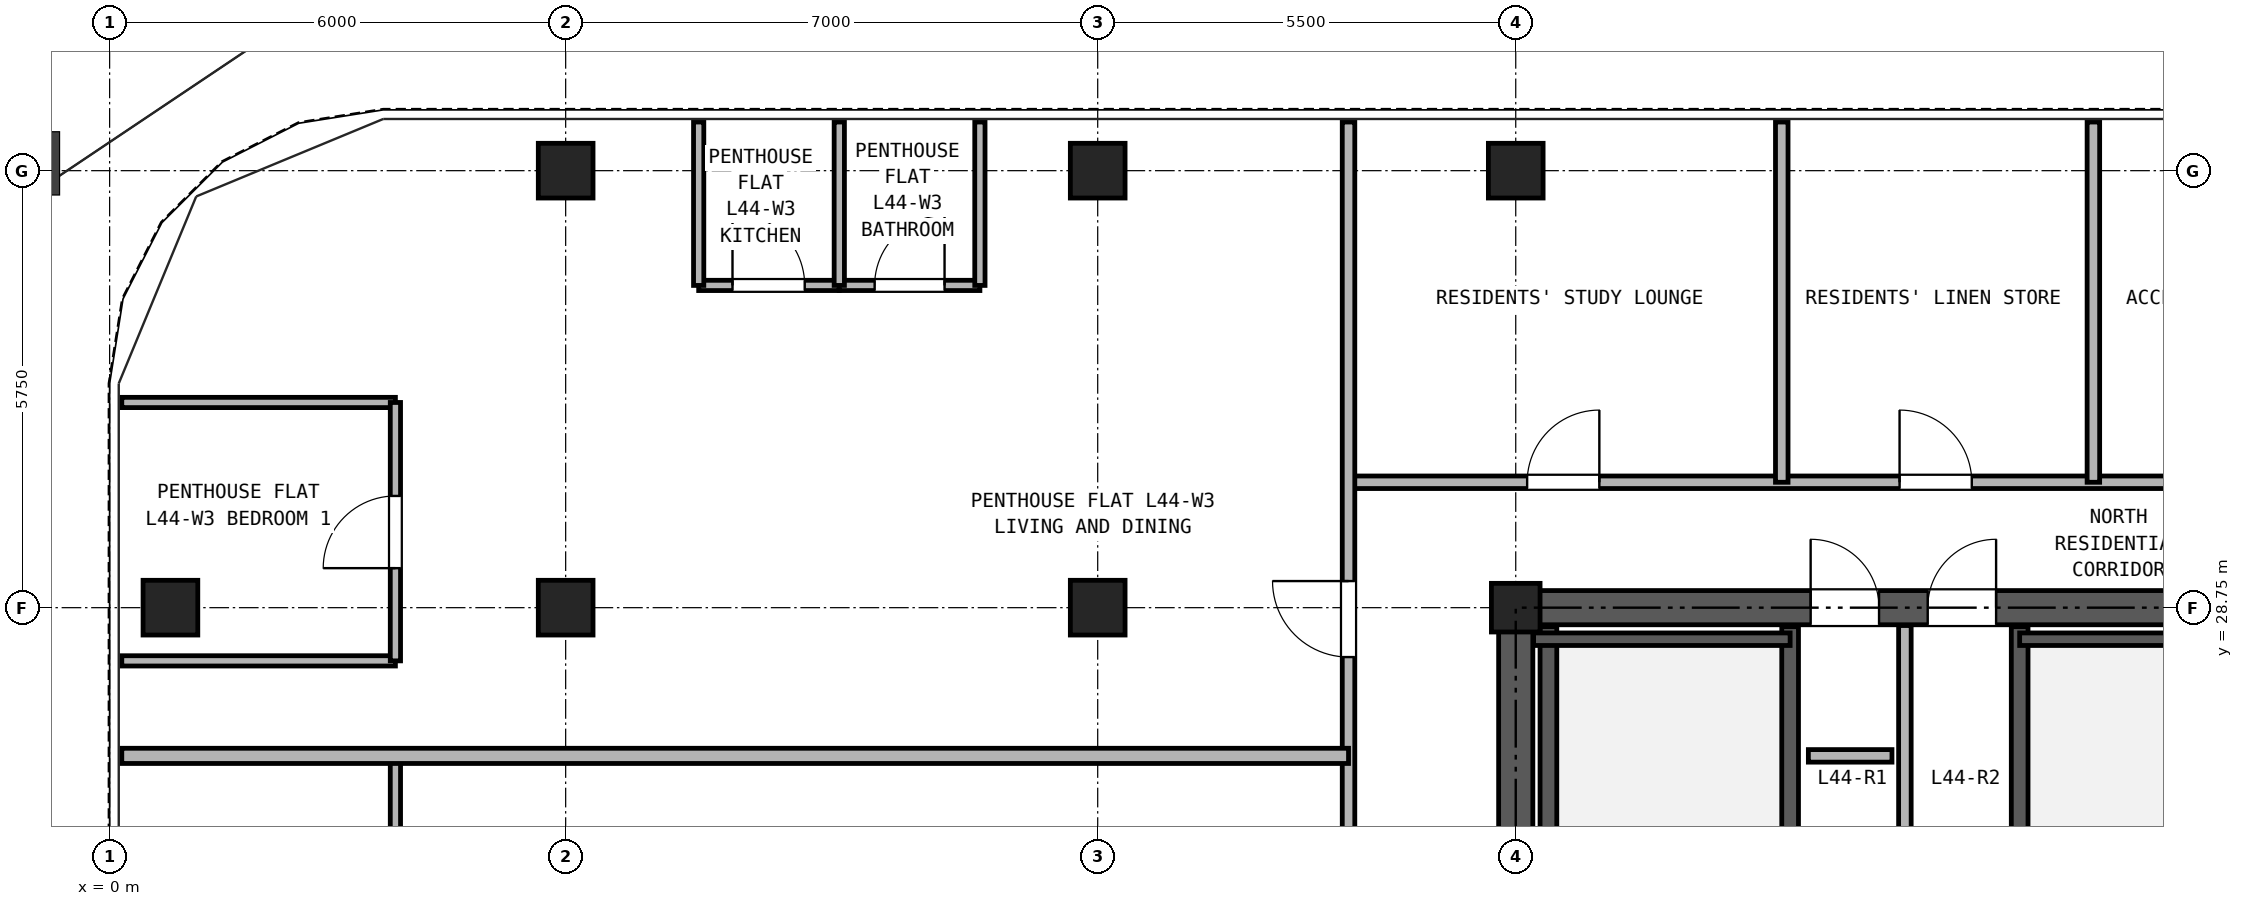
"""IFC4 building model, lengths in metres.
Left out: names, types, materials, properties, quantities, classifications, styles, units other than length and angle.
Written with IfcOpenShell. Run it as: python <this file> out.ifc"""

import sys

from ifc_helpers import new_model, si_unit, direction, frame, frame_2d, origin, origin_2d, place, context, subcontext, project, spatial, rectangle, hollow_rectangle, extrude, source, transform, mapped, element, fill, save


model = new_model("IFC4")
c1 = context("Model", 3, precision=1e-05, world=origin(), true_north=direction((0.0, 1.0)))
c2 = subcontext(c1, "Body", "Model", "MODEL_VIEW")
j1 = project(units=[si_unit("LENGTHUNIT", "METRE"), si_unit("PLANEANGLEUNIT", "RADIAN")], contexts=[c1])
p1 = place(None, origin())
s1 = spatial("IfcSite", under=j1, at=p1, CompositionType="ELEMENT")
p2 = place(p1, origin())
s2 = spatial("IfcBuilding", under=s1, at=p2, CompositionType="ELEMENT")
p3 = place(p2, frame((0.0, 0.0, 159.3)))
s3 = spatial("IfcBuildingStorey", under=s2, at=p3, CompositionType="ELEMENT", Elevation=159.3)
m1 = source(origin(), c2, "Body", "SweptSolid", [
    extrude(hollow_rectangle(XDim=0.72, YDim=0.72, WallThickness=0.04, at=origin_2d()), origin(), (0.0, 0.0, 1.0), 2.95),
])
for number, where, z_axis, x_axis in (
    (1, (6.0, 34.5, 0.0), (0.0, 0.0, 1.0), (1.0, 0.0, 0.0)),
    (2, (13.0, 34.5, 0.0), (0.0, 0.0, 1.0), (1.0, 0.0, 0.0)),
    (3, (18.5, 34.5, 0.0), (0.0, 0.0, 1.0), (1.0, 0.0, 0.0)),
    (4, (0.8, 28.75, 0.0), (0.0, 0.0, 1.0), (1.0, 0.0, 0.0)),
    (5, (6.0, 28.75, 0.0), (0.0, 0.0, 1.0), (1.0, 0.0, 0.0)),
    (6, (13.0, 28.75, 0.0), (0.0, 0.0, 1.0), (1.0, 0.0, 0.0)),
):
    element("IfcColumn", number, at=place(p3, frame(where, z_axis=z_axis, x_axis=x_axis)), inside=s3, PredefinedType="COLUMN", context=c2, shape_type="MappedRepresentation", body=[
        mapped(m1, transform((0.0, 0.0, 0.0), x_axis=(1.0, 0.0, 0.0), y_axis=(0.0, 1.0, 0.0), z_axis=(0.0, 0.0, 1.0), scale=1.0)),
    ])
m2 = source(origin(), c2, "Body", "SweptSolid", [
    extrude(hollow_rectangle(XDim=0.64, YDim=0.64, WallThickness=0.035, at=origin_2d()), origin(), (0.0, 0.0, 1.0), 2.95),
])
p4 = place(p3, frame((18.5, 28.75, 0.0), z_axis=(0.0, 0.0, 1.0), x_axis=(1.0, 0.0, 0.0)))
e7 = element("IfcColumn", 7, at=p4, inside=s3, PredefinedType="COLUMN", context=c2, shape_type="MappedRepresentation", body=[
    mapped(m2, transform((0.0, 0.0, 0.0), x_axis=(1.0, 0.0, 0.0), y_axis=(0.0, 1.0, 0.0), z_axis=(0.0, 0.0, 1.0), scale=1.0)),
])
p5 = place(p3, frame((18.275, 28.75, 0.0), z_axis=(0.0, 0.0, 1.0), x_axis=(1.0, 0.0, 0.0)))
e8 = element("IfcWall", 8, at=p5, inside=s3, PredefinedType="SHEAR", context=c2, shape_type="SweptSolid", body=[
    extrude(rectangle(XDim=10.45, YDim=0.45, at=frame_2d((5.225, 0.0))), origin(), (0.0, 0.0, 1.0), 2.95),
])
p6 = place(p5, frame((4.105, 0.0, 0.0)))
e9 = element("IfcOpeningElement", 9, at=p6, cuts=e8, PredefinedType="OPENING", context=c2, shape_type="SweptSolid", body=[
    extrude(rectangle(XDim=0.9, YDim=2.05, at=frame_2d((0.45, 1.025))), frame((0.0, 0.235, 0.0), z_axis=(0.0, -1.0, 0.0), x_axis=(1.0, 0.0, 0.0)), (0.0, 0.0, 1.0), 0.47),
])
p7 = place(p5, frame((5.645, 0.0, 0.0)))
e10 = element("IfcOpeningElement", 10, at=p7, cuts=e8, PredefinedType="OPENING", context=c2, shape_type="SweptSolid", body=[
    extrude(rectangle(XDim=0.9, YDim=2.05, at=frame_2d((0.45, 1.025))), frame((0.0, 0.235, 0.0), z_axis=(0.0, -1.0, 0.0), x_axis=(1.0, 0.0, 0.0)), (0.0, 0.0, 1.0), 0.47),
])
p8 = place(p3, frame((18.5, 11.725, 0.0), z_axis=(0.0, 0.0, 1.0), x_axis=(0.0, 1.0, 0.0)))
e11 = element("IfcWall", 11, at=p8, inside=s3, PredefinedType="SHEAR", context=c2, shape_type="SweptSolid", body=[
    extrude(rectangle(XDim=16.8, YDim=0.45, at=frame_2d((8.4, 0.0))), origin(), (0.0, 0.0, 1.0), 2.95),
])
p9 = place(p8, frame((7.425, 0.0, 0.0)))
e12 = element("IfcOpeningElement", 12, at=p9, cuts=e11, PredefinedType="OPENING", context=c2, shape_type="SweptSolid", body=[
    extrude(rectangle(XDim=1.15, YDim=2.2, at=frame_2d((0.575, 1.1))), frame((0.0, 0.235, 0.0), z_axis=(0.0, -1.0, 0.0), x_axis=(1.0, 0.0, 0.0)), (0.0, 0.0, 1.0), 0.47),
])
for number, where, z_axis, x_axis in (
    (13, (18.93, 21.39, 0.0), (0.0, 0.0, 1.0), (0.0, 1.0, 0.0)),
    (14, (22.11, 21.39, 0.0), (0.0, 0.0, 1.0), (0.0, 1.0, 0.0)),
    (15, (25.13, 21.39, 0.0), (0.0, 0.0, 1.0), (0.0, 1.0, 0.0)),
):
    element("IfcWall", number, at=place(p3, frame(where, z_axis=z_axis, x_axis=x_axis)), inside=s3, PredefinedType="SOLIDWALL", context=c2, shape_type="SweptSolid", body=[
        extrude(rectangle(XDim=7.11, YDim=0.22, at=frame_2d((3.555, 0.0))), origin(), (0.0, 0.0, 1.0), 2.95),
    ])
p10 = place(p3, frame((18.735, 28.335, 0.0), z_axis=(0.0, 0.0, 1.0), x_axis=(1.0, 0.0, 0.0)))
e16 = element("IfcWall", 16, at=p10, inside=s3, PredefinedType="PARTITIONING", context=c2, shape_type="SweptSolid", body=[
    extrude(rectangle(XDim=3.375, YDim=0.165, at=frame_2d((1.688, 0.0))), origin(), (0.0, 0.0, 1.0), 2.95),
])
p11 = place(p3, frame((25.13, 28.335, 0.0), z_axis=(0.0, 0.0, 1.0), x_axis=(1.0, 0.0, 0.0)))
e17 = element("IfcWall", 17, at=p11, inside=s3, PredefinedType="PARTITIONING", context=c2, shape_type="SweptSolid", body=[
    extrude(rectangle(XDim=3.135, YDim=0.165, at=frame_2d((1.567, 0.0))), origin(), (0.0, 0.0, 1.0), 2.95),
])
p12 = place(p3, frame((23.62, 24.4, 0.0), z_axis=(0.0, 0.0, 1.0), x_axis=(0.0, 1.0, 0.0)))
e18 = element("IfcWall", 18, at=p12, inside=s3, PredefinedType="PARTITIONING", context=c2, shape_type="SweptSolid", body=[
    extrude(rectangle(XDim=4.115, YDim=0.165, at=frame_2d((2.058, 0.0))), origin(), (0.0, 0.0, 1.0), 2.95),
])
p13 = place(p3, frame((16.3, 30.4, 0.0), z_axis=(0.0, 0.0, 1.0), x_axis=(1.0, 0.0, 0.0)))
e19 = element("IfcWall", 19, at=p13, inside=s3, PredefinedType="PARTITIONING", context=c2, shape_type="SweptSolid", body=[
    extrude(rectangle(XDim=14.4, YDim=0.165, at=frame_2d((7.2, 0.0))), origin(), (0.0, 0.0, 1.0), 2.95),
])
p14 = place(p13, frame((2.35, 0.0, 0.0)))
e20 = element("IfcOpeningElement", 20, at=p14, cuts=e19, PredefinedType="OPENING", context=c2, shape_type="SweptSolid", body=[
    extrude(rectangle(XDim=0.95, YDim=2.15, at=frame_2d((0.475, 1.075))), frame((0.0, 0.093, 0.0), z_axis=(0.0, -1.0, 0.0), x_axis=(1.0, 0.0, 0.0)), (0.0, 0.0, 1.0), 0.185),
])
p15 = place(p13, frame((7.25, 0.0, 0.0)))
e21 = element("IfcOpeningElement", 21, at=p15, cuts=e19, PredefinedType="OPENING", context=c2, shape_type="SweptSolid", body=[
    extrude(rectangle(XDim=0.95, YDim=2.15, at=frame_2d((0.475, 1.075))), frame((0.0, 0.093, 0.0), z_axis=(0.0, -1.0, 0.0), x_axis=(1.0, 0.0, 0.0)), (0.0, 0.0, 1.0), 0.185),
])
p16 = place(p13, frame((11.6, 0.0, 0.0)))
e22 = element("IfcOpeningElement", 22, at=p16, cuts=e19, PredefinedType="OPENING", context=c2, shape_type="SweptSolid", body=[
    extrude(rectangle(XDim=0.92, YDim=2.1, at=frame_2d((0.46, 1.05))), frame((0.0, 0.093, 0.0), z_axis=(0.0, -1.0, 0.0), x_axis=(1.0, 0.0, 0.0)), (0.0, 0.0, 1.0), 0.185),
])
p17 = place(p3, frame((16.3, 10.9, 0.0), z_axis=(0.0, 0.0, 1.0), x_axis=(0.0, 1.0, 0.0)))
e23 = element("IfcWall", 23, at=p17, inside=s3, PredefinedType="PARTITIONING", context=c2, shape_type="SweptSolid", body=[
    extrude(rectangle(XDim=24.24, YDim=0.165, at=frame_2d((12.12, 0.0))), origin(), (0.0, 0.0, 1.0), 2.95),
])
p18 = place(p17, frame((3.3, 0.0, 0.0)))
e24 = element("IfcOpeningElement", 24, at=p18, cuts=e23, PredefinedType="OPENING", context=c2, shape_type="SweptSolid", body=[
    extrude(rectangle(XDim=1.0, YDim=2.15, at=frame_2d((0.5, 1.075))), frame((0.0, 0.093, 0.0), z_axis=(0.0, -1.0, 0.0), x_axis=(1.0, 0.0, 0.0)), (0.0, 0.0, 1.0), 0.185),
])
p19 = place(p17, frame((11.25, 0.0, 0.0)))
e25 = element("IfcOpeningElement", 25, at=p19, cuts=e23, PredefinedType="OPENING", context=c2, shape_type="SweptSolid", body=[
    extrude(rectangle(XDim=1.0, YDim=2.15, at=frame_2d((0.5, 1.075))), frame((0.0, 0.093, 0.0), z_axis=(0.0, -1.0, 0.0), x_axis=(1.0, 0.0, 0.0)), (0.0, 0.0, 1.0), 0.185),
])
p20 = place(p17, frame((17.2, 0.0, 0.0)))
e26 = element("IfcOpeningElement", 26, at=p20, cuts=e23, PredefinedType="OPENING", context=c2, shape_type="SweptSolid", body=[
    extrude(rectangle(XDim=1.0, YDim=2.15, at=frame_2d((0.5, 1.075))), frame((0.0, 0.093, 0.0), z_axis=(0.0, -1.0, 0.0), x_axis=(1.0, 0.0, 0.0)), (0.0, 0.0, 1.0), 0.185),
])
p21 = place(p3, frame((3.76, 22.444, 0.0), z_axis=(0.0, 0.0, 1.0), x_axis=(0.0, 1.0, 0.0)))
e27 = element("IfcWall", 27, at=p21, inside=s3, PredefinedType="PARTITIONING", context=c2, shape_type="SweptSolid", body=[
    extrude(rectangle(XDim=4.356, YDim=0.135, at=frame_2d((2.178, 0.0))), origin(), (0.0, 0.0, 1.0), 2.95),
])
p22 = place(p21, frame((1.698, 0.0, 0.0)))
e28 = element("IfcOpeningElement", 28, at=p22, cuts=e27, PredefinedType="OPENING", context=c2, shape_type="SweptSolid", body=[
    extrude(rectangle(XDim=0.95, YDim=2.15, at=frame_2d((0.475, 1.075))), frame((0.0, 0.077, 0.0), z_axis=(0.0, -1.0, 0.0), x_axis=(1.0, 0.0, 0.0)), (0.0, 0.0, 1.0), 0.155),
])
p23 = place(p3, frame((0.16, 26.8, 0.0), z_axis=(0.0, 0.0, 1.0), x_axis=(1.0, 0.0, 0.0)))
e29 = element("IfcWall", 29, at=p23, inside=s3, PredefinedType="PARTITIONING", context=c2, shape_type="SweptSolid", body=[
    extrude(rectangle(XDim=16.14, YDim=0.2, at=frame_2d((8.07, 0.0))), origin(), (0.0, 0.0, 1.0), 2.95),
])
p24 = place(p3, frame((7.75, 32.99, 0.0), z_axis=(0.0, 0.0, 1.0), x_axis=(1.0, 0.0, 0.0)))
e30 = element("IfcWall", 30, at=p24, inside=s3, PredefinedType="PARTITIONING", context=c2, shape_type="SweptSolid", body=[
    extrude(rectangle(XDim=1.85, YDim=0.135, at=frame_2d((0.925, 0.0))), origin(), (0.0, 0.0, 1.0), 2.95),
])
p25 = place(p24, frame((0.445, 0.0, 0.0)))
e31 = element("IfcOpeningElement", 31, at=p25, cuts=e30, PredefinedType="OPENING", context=c2, shape_type="SweptSolid", body=[
    extrude(rectangle(XDim=0.95, YDim=2.15, at=frame_2d((0.475, 1.075))), frame((0.0, 0.077, 0.0), z_axis=(0.0, -1.0, 0.0), x_axis=(1.0, 0.0, 0.0)), (0.0, 0.0, 1.0), 0.155),
])
p26 = place(p3, frame((9.6, 32.99, 0.0), z_axis=(0.0, 0.0, 1.0), x_axis=(1.0, 0.0, 0.0)))
e32 = element("IfcWall", 32, at=p26, inside=s3, PredefinedType="PARTITIONING", context=c2, shape_type="SweptSolid", body=[
    extrude(rectangle(XDim=1.85, YDim=0.135, at=frame_2d((0.925, 0.0))), origin(), (0.0, 0.0, 1.0), 2.95),
])
p27 = place(p26, frame((0.465, 0.0, 0.0)))
e33 = element("IfcOpeningElement", 33, at=p27, cuts=e32, PredefinedType="OPENING", context=c2, shape_type="SweptSolid", body=[
    extrude(rectangle(XDim=0.92, YDim=2.1, at=frame_2d((0.46, 1.05))), frame((0.0, 0.077, 0.0), z_axis=(0.0, -1.0, 0.0), x_axis=(1.0, 0.0, 0.0)), (0.0, 0.0, 1.0), 0.155),
])
for number, where, z_axis, x_axis in (
    (34, (7.75, 32.99, 0.0), (0.0, 0.0, 1.0), (0.0, 1.0, 0.0)),
    (35, (9.6, 32.99, 0.0), (0.0, 0.0, 1.0), (0.0, 1.0, 0.0)),
    (36, (11.45, 32.99, 0.0), (0.0, 0.0, 1.0), (0.0, 1.0, 0.0)),
):
    element("IfcWall", number, at=place(p3, frame(where, z_axis=z_axis, x_axis=x_axis)), inside=s3, PredefinedType="PARTITIONING", context=c2, shape_type="SweptSolid", body=[
        extrude(rectangle(XDim=2.15, YDim=0.135, at=frame_2d((1.075, 0.0))), origin(), (0.0, 0.0, 1.0), 2.95),
    ])
for number, where, z_axis, x_axis in (
    (37, (0.16, 28.05, 0.0), (0.0, 0.0, 1.0), (1.0, 0.0, 0.0)),
    (38, (0.16, 31.45, 0.0), (0.0, 0.0, 1.0), (1.0, 0.0, 0.0)),
):
    element("IfcWall", number, at=place(p3, frame(where, z_axis=z_axis, x_axis=x_axis)), inside=s3, PredefinedType="PARTITIONING", context=c2, shape_type="SweptSolid", body=[
        extrude(rectangle(XDim=3.6, YDim=0.135, at=frame_2d((1.8, 0.0))), origin(), (0.0, 0.0, 1.0), 2.95),
    ])
p28 = place(p3, frame((3.76, 28.05, 0.0), z_axis=(0.0, 0.0, 1.0), x_axis=(0.0, 1.0, 0.0)))
e39 = element("IfcWall", 39, at=p28, inside=s3, PredefinedType="PARTITIONING", context=c2, shape_type="SweptSolid", body=[
    extrude(rectangle(XDim=3.4, YDim=0.135, at=frame_2d((1.7, 0.0))), origin(), (0.0, 0.0, 1.0), 2.95),
])
p29 = place(p28, frame((1.22, 0.0, 0.0)))
e40 = element("IfcOpeningElement", 40, at=p29, cuts=e39, PredefinedType="OPENING", context=c2, shape_type="SweptSolid", body=[
    extrude(rectangle(XDim=0.95, YDim=2.15, at=frame_2d((0.475, 1.075))), frame((0.0, 0.077, 0.0), z_axis=(0.0, -1.0, 0.0), x_axis=(1.0, 0.0, 0.0)), (0.0, 0.0, 1.0), 0.155),
])
for number, where, z_axis, x_axis in (
    (41, (22.0, 30.4, 0.0), (0.0, 0.0, 1.0), (0.0, 1.0, 0.0)),
    (42, (26.1, 30.4, 0.0), (0.0, 0.0, 1.0), (0.0, 1.0, 0.0)),
):
    element("IfcWall", number, at=place(p3, frame(where, z_axis=z_axis, x_axis=x_axis)), inside=s3, PredefinedType="PARTITIONING", context=c2, shape_type="SweptSolid", body=[
        extrude(rectangle(XDim=4.74, YDim=0.165, at=frame_2d((2.37, 0.0))), origin(), (0.0, 0.0, 1.0), 2.95),
    ])
p30 = place(p3, frame((22.35, 26.8, 0.0), z_axis=(0.0, 0.0, 1.0), x_axis=(1.0, 0.0, 0.0)))
e43 = element("IfcWall", 43, at=p30, inside=s3, PredefinedType="PARTITIONING", context=c2, shape_type="SweptSolid", body=[
    extrude(rectangle(XDim=1.1, YDim=0.165, at=frame_2d((0.55, 0.0))), origin(), (0.0, 0.0, 1.0), 2.95),
])
p31 = place(p6, origin())
e44 = element("IfcDoor", 44, at=p31, inside=s3, OperationType="SINGLE_SWING_LEFT", PredefinedType="DOOR", context=c2, shape_type="SweptSolid", body=[
    extrude(rectangle(XDim=0.9, YDim=2.05, at=frame_2d((0.45, 1.025))), frame((0.0, 0.025, 0.0), z_axis=(0.0, -1.0, 0.0), x_axis=(1.0, 0.0, 0.0)), (0.0, 0.0, 1.0), 0.05),
])
fill(e9, e44)
p32 = place(p7, origin())
e45 = element("IfcDoor", 45, at=p32, inside=s3, OperationType="SINGLE_SWING_RIGHT", PredefinedType="DOOR", context=c2, shape_type="SweptSolid", body=[
    extrude(rectangle(XDim=0.9, YDim=2.05, at=frame_2d((0.45, 1.025))), frame((0.0, 0.025, 0.0), z_axis=(0.0, -1.0, 0.0), x_axis=(1.0, 0.0, 0.0)), (0.0, 0.0, 1.0), 0.05),
])
fill(e10, e45)
p33 = place(p25, frame((0.95, 0.0, 0.0), z_axis=(0.0, 0.0, 1.0), x_axis=(-1.0, 0.0, 0.0)))
e46 = element("IfcDoor", 46, at=p33, inside=s3, OperationType="SINGLE_SWING_LEFT", PredefinedType="DOOR", context=c2, shape_type="SweptSolid", body=[
    extrude(rectangle(XDim=0.95, YDim=2.15, at=frame_2d((0.475, 1.075))), frame((0.0, 0.025, 0.0), z_axis=(0.0, -1.0, 0.0), x_axis=(1.0, 0.0, 0.0)), (0.0, 0.0, 1.0), 0.05),
])
fill(e31, e46)
p34 = place(p27, frame((0.92, 0.0, 0.0), z_axis=(0.0, 0.0, 1.0), x_axis=(-1.0, 0.0, 0.0)))
e47 = element("IfcDoor", 47, at=p34, inside=s3, OperationType="SINGLE_SWING_RIGHT", PredefinedType="DOOR", context=c2, shape_type="SweptSolid", body=[
    extrude(rectangle(XDim=0.92, YDim=2.1, at=frame_2d((0.46, 1.05))), frame((0.0, 0.025, 0.0), z_axis=(0.0, -1.0, 0.0), x_axis=(1.0, 0.0, 0.0)), (0.0, 0.0, 1.0), 0.05),
])
fill(e33, e47)
p35 = place(p29, origin())
e48 = element("IfcDoor", 48, at=p35, inside=s3, OperationType="SINGLE_SWING_LEFT", PredefinedType="DOOR", context=c2, shape_type="SweptSolid", body=[
    extrude(rectangle(XDim=0.95, YDim=2.15, at=frame_2d((0.475, 1.075))), frame((0.0, 0.025, 0.0), z_axis=(0.0, -1.0, 0.0), x_axis=(1.0, 0.0, 0.0)), (0.0, 0.0, 1.0), 0.05),
])
fill(e40, e48)
p36 = place(p20, origin())
e49 = element("IfcDoor", 49, at=p36, inside=s3, OperationType="SINGLE_SWING_RIGHT", PredefinedType="DOOR", context=c2, shape_type="SweptSolid", body=[
    extrude(rectangle(XDim=1.0, YDim=2.15, at=frame_2d((0.5, 1.075))), frame((0.0, 0.025, 0.0), z_axis=(0.0, -1.0, 0.0), x_axis=(1.0, 0.0, 0.0)), (0.0, 0.0, 1.0), 0.05),
])
fill(e26, e49)
p37 = place(p14, origin())
e50 = element("IfcDoor", 50, at=p37, inside=s3, OperationType="SINGLE_SWING_RIGHT", PredefinedType="DOOR", context=c2, shape_type="SweptSolid", body=[
    extrude(rectangle(XDim=0.95, YDim=2.15, at=frame_2d((0.475, 1.075))), frame((0.0, 0.025, 0.0), z_axis=(0.0, -1.0, 0.0), x_axis=(1.0, 0.0, 0.0)), (0.0, 0.0, 1.0), 0.05),
])
fill(e20, e50)
p38 = place(p15, origin())
e51 = element("IfcDoor", 51, at=p38, inside=s3, OperationType="SINGLE_SWING_LEFT", PredefinedType="DOOR", context=c2, shape_type="SweptSolid", body=[
    extrude(rectangle(XDim=0.95, YDim=2.15, at=frame_2d((0.475, 1.075))), frame((0.0, 0.025, 0.0), z_axis=(0.0, -1.0, 0.0), x_axis=(1.0, 0.0, 0.0)), (0.0, 0.0, 1.0), 0.05),
])
fill(e21, e51)
save(model, sys.argv[1])
